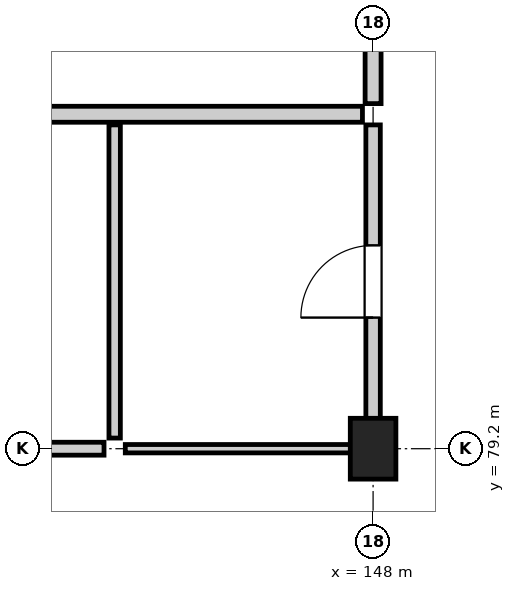
"""IFC4 building model, lengths in metres.
Left out: names, types, materials, properties, quantities, classifications, styles, units other than length and angle.
Written with IfcOpenShell. Run it as: python <this file> out.ifc"""

import sys

from ifc_helpers import new_model, si_unit, direction, frame, frame_2d, origin, origin_2d, place, context, subcontext, project, spatial, rectangle, extrude, element, fill, save


model = new_model("IFC4")
c1 = context("Model", 3, precision=1e-05, world=origin(), true_north=direction((0.0, 1.0)))
c2 = subcontext(c1, "Body", "Model", "MODEL_VIEW")
j1 = project(units=[si_unit("LENGTHUNIT", "METRE"), si_unit("PLANEANGLEUNIT", "RADIAN")], contexts=[c1])
p1 = place(None, origin())
s1 = spatial("IfcSite", under=j1, at=p1, CompositionType="ELEMENT")
p2 = place(p1, origin())
s2 = spatial("IfcBuilding", under=s1, at=p2, CompositionType="ELEMENT")
p3 = place(p2, frame((0.0, 0.0, 50.9)))
s3 = spatial("IfcBuildingStorey", under=s2, at=p3, CompositionType="ELEMENT", Elevation=50.9)
p4 = place(p3, frame((148.0, 79.2, 0.0), z_axis=(0.0, 0.0, 1.0), x_axis=(1.0, 0.0, 0.0)))
e1 = element("IfcColumn", 1, at=p4, inside=s3, PredefinedType="COLUMN", context=c2, shape_type="SweptSolid", body=[
    extrude(rectangle(XDim=0.6, YDim=0.8, at=origin_2d()), origin(), (0.0, 0.0, 1.0), 3.9),
])
p5 = place(p3, frame((140.14, 83.6, 0.0), z_axis=(0.0, 0.0, 1.0), x_axis=(1.0, 0.0, 0.0)))
e2 = element("IfcWall", 2, at=p5, inside=s3, PredefinedType="SOLIDWALL", context=c2, shape_type="SweptSolid", body=[
    extrude(rectangle(XDim=7.72, YDim=0.21, at=frame_2d((3.86, 0.0))), origin(), (0.0, 0.0, 1.0), 3.62),
])
p6 = place(p3, frame((148.0, 83.74, 0.0), z_axis=(0.0, 0.0, 1.0), x_axis=(0.0, 1.0, 0.0)))
e3 = element("IfcWall", 3, at=p6, inside=s3, PredefinedType="SOLIDWALL", context=c2, shape_type="SweptSolid", body=[
    extrude(rectangle(XDim=3.32, YDim=0.21, at=frame_2d((1.66, 0.0))), origin(), (0.0, 0.0, 1.0), 3.155),
])
p7 = place(p6, frame((1.16, 0.0, 0.0)))
e4 = element("IfcOpeningElement", 4, at=p7, cuts=e3, PredefinedType="OPENING", context=c2, shape_type="SweptSolid", body=[
    extrude(rectangle(XDim=1.0, YDim=2.15, at=frame_2d((0.5, 1.075))), frame((0.0, 0.117, 0.0), z_axis=(0.0, -1.0, 0.0), x_axis=(1.0, 0.0, 0.0)), (0.0, 0.0, 1.0), 0.234),
])
p8 = place(p3, frame((140.14, 79.2, 0.0), z_axis=(0.0, 0.0, 1.0), x_axis=(1.0, 0.0, 0.0)))
e5 = element("IfcWall", 5, at=p8, inside=s3, PredefinedType="PARTITIONING", context=c2, shape_type="SweptSolid", body=[
    extrude(rectangle(XDim=4.32, YDim=0.17, at=frame_2d((2.16, 0.0))), origin(), (0.0, 0.0, 1.0), 3.055),
])
p9 = place(p8, frame((1.66, 0.0, 0.0)))
e6 = element("IfcOpeningElement", 6, at=p9, cuts=e5, PredefinedType="OPENING", context=c2, shape_type="SweptSolid", body=[
    extrude(rectangle(XDim=1.0, YDim=2.15, at=frame_2d((0.5, 1.075))), frame((0.0, 0.097, 0.0), z_axis=(0.0, -1.0, 0.0), x_axis=(1.0, 0.0, 0.0)), (0.0, 0.0, 1.0), 0.194),
])
p10 = place(p3, frame((144.6, 79.34, 0.0), z_axis=(0.0, 0.0, 1.0), x_axis=(0.0, 1.0, 0.0)))
e7 = element("IfcWall", 7, at=p10, inside=s3, PredefinedType="PARTITIONING", context=c2, shape_type="SweptSolid", body=[
    extrude(rectangle(XDim=4.12, YDim=0.15, at=frame_2d((2.06, 0.0))), origin(), (0.0, 0.0, 1.0), 3.62),
])
p11 = place(p3, frame((144.74, 79.2, 0.0), z_axis=(0.0, 0.0, 1.0), x_axis=(1.0, 0.0, 0.0)))
e8 = element("IfcWall", 8, at=p11, inside=s3, PredefinedType="PARTITIONING", context=c2, shape_type="SweptSolid", body=[
    extrude(rectangle(XDim=3.12, YDim=0.11, at=frame_2d((1.56, 0.0))), origin(), (0.0, 0.0, 1.0), 3.055),
])
p12 = place(p3, frame((148.0, 79.34, 0.0), z_axis=(0.0, 0.0, 1.0), x_axis=(0.0, 1.0, 0.0)))
e9 = element("IfcWall", 9, at=p12, inside=s3, PredefinedType="PARTITIONING", context=c2, shape_type="SweptSolid", body=[
    extrude(rectangle(XDim=4.12, YDim=0.19, at=frame_2d((2.06, 0.0))), origin(), (0.0, 0.0, 1.0), 3.155),
])
p13 = place(p12, frame((1.585, 0.0, 0.0)))
e10 = element("IfcOpeningElement", 10, at=p13, cuts=e9, PredefinedType="OPENING", context=c2, shape_type="SweptSolid", body=[
    extrude(rectangle(XDim=0.95, YDim=2.15, at=frame_2d((0.475, 1.075))), frame((0.0, 0.107, 0.0), z_axis=(0.0, -1.0, 0.0), x_axis=(1.0, 0.0, 0.0)), (0.0, 0.0, 1.0), 0.214),
])
p14 = place(p13, origin())
e11 = element("IfcDoor", 11, at=p14, inside=s3, OperationType="SINGLE_SWING_LEFT", PredefinedType="DOOR", context=c2, shape_type="SweptSolid", body=[
    extrude(rectangle(XDim=0.95, YDim=2.15, at=frame_2d((0.475, 1.075))), frame((0.0, 0.025, 0.0), z_axis=(0.0, -1.0, 0.0), x_axis=(1.0, 0.0, 0.0)), (0.0, 0.0, 1.0), 0.05),
])
fill(e10, e11)
save(model, sys.argv[1])
